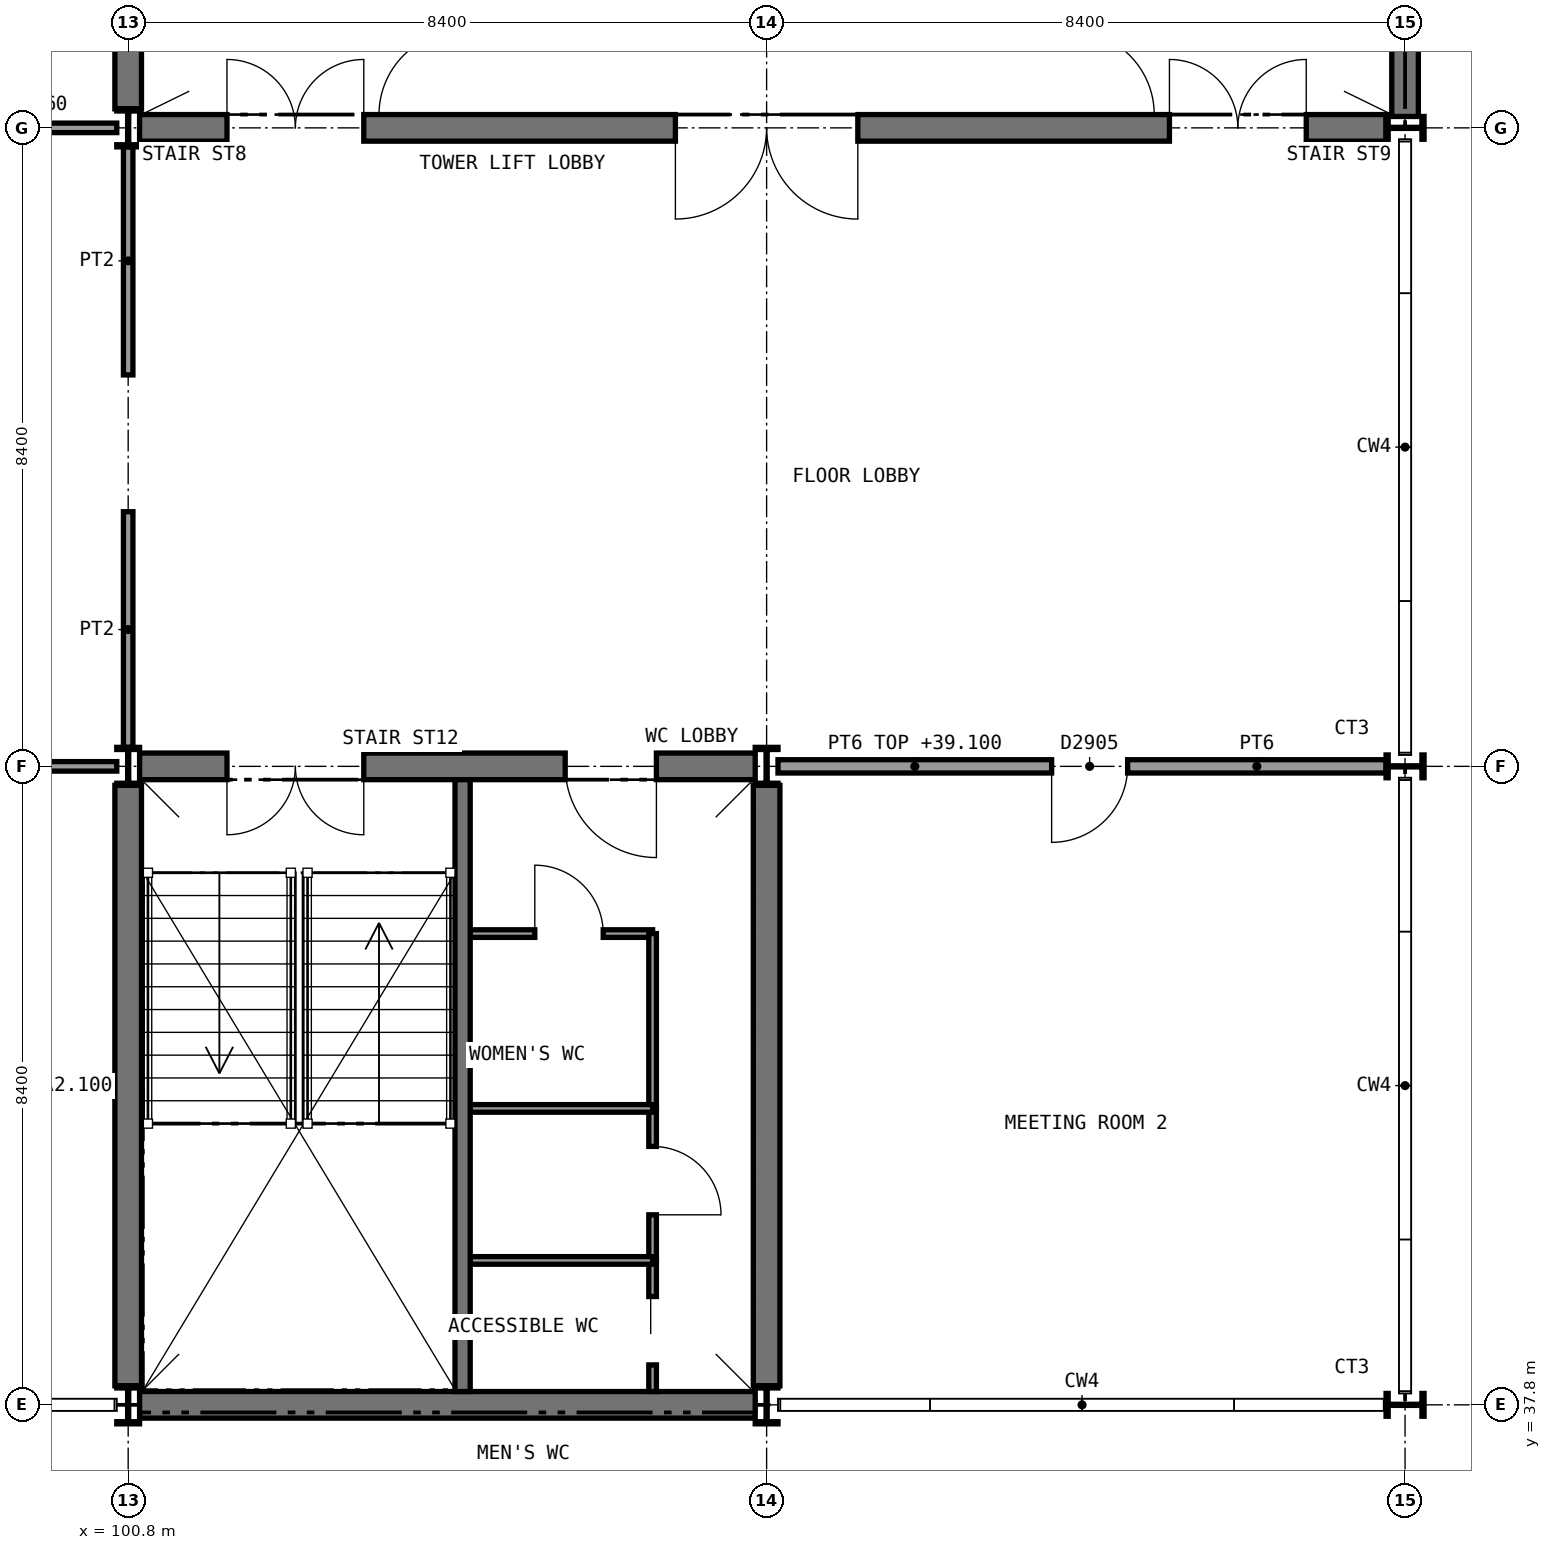
"""IFC4 building model, lengths in metres.
Left out: names, types, materials, properties, quantities, classifications, styles, units other than length and angle.
Written with IfcOpenShell. Run it as: python <this file> out.ifc"""

import sys

from ifc_helpers import new_model, si_unit, direction, frame, frame_2d, origin, origin_2d, place, context, subcontext, project, spatial, rectangle, i_section, extrude, element, fill, save


model = new_model("IFC4")
c1 = context("Model", 3, precision=1e-05, world=origin(), true_north=direction((0.0, 1.0)))
c2 = subcontext(c1, "Body", "Model", "MODEL_VIEW")
j1 = project(units=[si_unit("LENGTHUNIT", "METRE"), si_unit("PLANEANGLEUNIT", "RADIAN")], contexts=[c1])
p1 = place(None, origin())
s1 = spatial("IfcSite", under=j1, at=p1, CompositionType="ELEMENT")
p2 = place(p1, origin())
s2 = spatial("IfcBuilding", under=s1, at=p2, CompositionType="ELEMENT")
p3 = place(p2, frame((0.0, 0.0, 35.6)))
s3 = spatial("IfcBuildingStorey", under=s2, at=p3, CompositionType="ELEMENT", Elevation=35.6)
p4 = place(p3, frame((100.95, 54.6, 0.0), z_axis=(0.0, 0.0, 1.0), x_axis=(1.0, 0.0, 0.0)))
e1 = element("IfcWall", 1, at=p4, inside=s3, PredefinedType="SHEAR", context=c2, shape_type="SweptSolid", body=[
    extrude(rectangle(XDim=16.4, YDim=0.35, at=frame_2d((8.2, 0.0))), origin(), (0.0, 0.0, 1.0), 3.85),
])
p5 = place(p4, frame((1.15, 0.0, 0.0)))
e2 = element("IfcOpeningElement", 2, at=p5, cuts=e1, PredefinedType="OPENING", context=c2, shape_type="SweptSolid", body=[
    extrude(rectangle(XDim=1.8, YDim=2.1, at=frame_2d((0.9, 1.05))), frame((0.0, 0.185, 0.0), z_axis=(0.0, -1.0, 0.0), x_axis=(1.0, 0.0, 0.0)), (0.0, 0.0, 1.0), 0.37),
])
p6 = place(p4, frame((13.55, 0.0, 0.0)))
e3 = element("IfcOpeningElement", 3, at=p6, cuts=e1, PredefinedType="OPENING", context=c2, shape_type="SweptSolid", body=[
    extrude(rectangle(XDim=1.8, YDim=2.1, at=frame_2d((0.9, 1.05))), frame((0.0, 0.185, 0.0), z_axis=(0.0, -1.0, 0.0), x_axis=(1.0, 0.0, 0.0)), (0.0, 0.0, 1.0), 0.37),
])
p7 = place(p4, frame((7.05, 0.0, 0.0)))
e4 = element("IfcOpeningElement", 4, at=p7, cuts=e1, PredefinedType="OPENING", context=c2, shape_type="SweptSolid", body=[
    extrude(rectangle(XDim=2.4, YDim=2.4, at=frame_2d((1.2, 1.2))), frame((0.0, 0.185, 0.0), z_axis=(0.0, -1.0, 0.0), x_axis=(1.0, 0.0, 0.0)), (0.0, 0.0, 1.0), 0.37),
])
p8 = place(p3, frame((100.8, 54.85, 0.0), z_axis=(0.0, 0.0, 1.0), x_axis=(0.0, 1.0, 0.0)))
e5 = element("IfcWall", 5, at=p8, inside=s3, PredefinedType="SHEAR", context=c2, shape_type="SweptSolid", body=[
    extrude(rectangle(XDim=7.9, YDim=0.35, at=frame_2d((3.95, 0.0))), origin(), (0.0, 0.0, 1.0), 3.85),
])
for number, where, z_axis, x_axis in (
    (6, (117.6, 54.75, 0.0), (0.0, 0.0, 1.0), (0.0, 1.0, 0.0)),
    (7, (100.95, 37.8, 0.0), (0.0, 0.0, 1.0), (1.0, 0.0, 0.0)),
):
    element("IfcWall", number, at=place(p3, frame(where, z_axis=z_axis, x_axis=x_axis)), inside=s3, PredefinedType="SHEAR", context=c2, shape_type="SweptSolid", body=[
        extrude(rectangle(XDim=8.1, YDim=0.35, at=frame_2d((4.05, 0.0))), origin(), (0.0, 0.0, 1.0), 3.85),
    ])
p9 = place(p3, frame((100.95, 46.2, 0.0), z_axis=(0.0, 0.0, 1.0), x_axis=(1.0, 0.0, 0.0)))
e8 = element("IfcWall", 8, at=p9, inside=s3, PredefinedType="SHEAR", context=c2, shape_type="SweptSolid", body=[
    extrude(rectangle(XDim=8.1, YDim=0.35, at=frame_2d((4.05, 0.0))), origin(), (0.0, 0.0, 1.0), 3.85),
])
p10 = place(p9, frame((1.15, 0.0, 0.0)))
e9 = element("IfcOpeningElement", 9, at=p10, cuts=e8, PredefinedType="OPENING", context=c2, shape_type="SweptSolid", body=[
    extrude(rectangle(XDim=1.8, YDim=2.1, at=frame_2d((0.9, 1.05))), frame((0.0, 0.185, 0.0), z_axis=(0.0, -1.0, 0.0), x_axis=(1.0, 0.0, 0.0)), (0.0, 0.0, 1.0), 0.37),
])
p11 = place(p9, frame((5.6, 0.0, 0.0)))
e10 = element("IfcOpeningElement", 10, at=p11, cuts=e8, PredefinedType="OPENING", context=c2, shape_type="SweptSolid", body=[
    extrude(rectangle(XDim=1.2, YDim=2.1, at=frame_2d((0.6, 1.05))), frame((0.0, 0.185, 0.0), z_axis=(0.0, -1.0, 0.0), x_axis=(1.0, 0.0, 0.0)), (0.0, 0.0, 1.0), 0.37),
])
for number, where, z_axis, x_axis in (
    (11, (100.8, 38.05, 0.0), (0.0, 0.0, 1.0), (0.0, 1.0, 0.0)),
    (12, (109.2, 38.05, 0.0), (0.0, 0.0, 1.0), (0.0, 1.0, 0.0)),
):
    element("IfcWall", number, at=place(p3, frame(where, z_axis=z_axis, x_axis=x_axis)), inside=s3, PredefinedType="SHEAR", context=c2, shape_type="SweptSolid", body=[
        extrude(rectangle(XDim=7.9, YDim=0.35, at=frame_2d((3.95, 0.0))), origin(), (0.0, 0.0, 1.0), 3.85),
    ])
for number, where, z_axis, x_axis in (
    (13, (100.8, 37.8, 0.0), (0.0, 0.0, 1.0), (1.0, 0.0, 0.0)),
    (14, (100.8, 46.2, 0.0), (0.0, 0.0, 1.0), (1.0, 0.0, 0.0)),
    (15, (100.8, 54.6, 0.0), (0.0, 0.0, 1.0), (1.0, 0.0, 0.0)),
    (16, (109.2, 37.8, 0.0), (0.0, 0.0, 1.0), (1.0, 0.0, 0.0)),
    (17, (109.2, 46.2, 0.0), (0.0, 0.0, 1.0), (1.0, 0.0, 0.0)),
    (18, (117.6, 37.8, 0.0), (0.0, 0.0, 1.0), (0.0, 1.0, 0.0)),
    (19, (117.6, 46.2, 0.0), (0.0, 0.0, 1.0), (0.0, 1.0, 0.0)),
    (20, (117.6, 54.6, 0.0), (0.0, 0.0, 1.0), (0.0, 1.0, 0.0)),
):
    element("IfcColumn", number, at=place(p3, frame(where, z_axis=z_axis, x_axis=x_axis)), inside=s3, PredefinedType="COLUMN", context=c2, shape_type="SweptSolid", body=[
        extrude(i_section(OverallWidth=0.3, OverallDepth=0.5, WebThickness=0.014, FlangeThickness=0.028, FilletRadius=0.027, at=origin_2d()), origin(), (0.0, 0.0, 1.0), 4.0),
    ])
p12 = place(p3, frame((105.3, 44.0, 0.0), z_axis=(0.0, 0.0, 1.0), x_axis=(1.0, 0.0, 0.0)))
e21 = element("IfcWall", 21, at=p12, inside=s3, PredefinedType="PARTITIONING", context=c2, shape_type="SweptSolid", body=[
    extrude(rectangle(XDim=2.4, YDim=0.1, at=frame_2d((1.2, 0.0))), origin(), (0.0, 0.0, 1.0), 3.78),
])
p13 = place(p12, frame((0.85, 0.0, 0.0)))
e22 = element("IfcOpeningElement", 22, at=p13, cuts=e21, PredefinedType="OPENING", context=c2, shape_type="SweptSolid", body=[
    extrude(rectangle(XDim=0.9, YDim=2.1, at=frame_2d((0.45, 1.05))), frame((0.0, 0.06, 0.0), z_axis=(0.0, -1.0, 0.0), x_axis=(1.0, 0.0, 0.0)), (0.0, 0.0, 1.0), 0.12),
])
p14 = place(p3, frame((107.7, 41.7, 0.0), z_axis=(0.0, 0.0, 1.0), x_axis=(0.0, 1.0, 0.0)))
e23 = element("IfcWall", 23, at=p14, inside=s3, PredefinedType="PARTITIONING", context=c2, shape_type="SweptSolid", body=[
    extrude(rectangle(XDim=2.3, YDim=0.1, at=frame_2d((1.15, 0.0))), origin(), (0.0, 0.0, 1.0), 3.78),
])
p15 = place(p3, frame((107.7, 39.7, 0.0), z_axis=(0.0, 0.0, 1.0), x_axis=(0.0, 1.0, 0.0)))
e24 = element("IfcWall", 24, at=p15, inside=s3, PredefinedType="PARTITIONING", context=c2, shape_type="SweptSolid", body=[
    extrude(rectangle(XDim=2.0, YDim=0.1, at=frame_2d((1.0, 0.0))), origin(), (0.0, 0.0, 1.0), 3.78),
])
p16 = place(p15, frame((0.6, 0.0, 0.0)))
e25 = element("IfcOpeningElement", 25, at=p16, cuts=e24, PredefinedType="OPENING", context=c2, shape_type="SweptSolid", body=[
    extrude(rectangle(XDim=0.9, YDim=2.1, at=frame_2d((0.45, 1.05))), frame((0.0, 0.06, 0.0), z_axis=(0.0, -1.0, 0.0), x_axis=(1.0, 0.0, 0.0)), (0.0, 0.0, 1.0), 0.12),
])
p17 = place(p3, frame((107.7, 37.975, 0.0), z_axis=(0.0, 0.0, 1.0), x_axis=(0.0, 1.0, 0.0)))
e26 = element("IfcWall", 26, at=p17, inside=s3, PredefinedType="PARTITIONING", context=c2, shape_type="SweptSolid", body=[
    extrude(rectangle(XDim=1.725, YDim=0.1, at=frame_2d((0.862, 0.0))), origin(), (0.0, 0.0, 1.0), 3.78),
])
p18 = place(p17, frame((0.35, 0.0, 0.0)))
e27 = element("IfcOpeningElement", 27, at=p18, cuts=e26, PredefinedType="OPENING", context=c2, shape_type="SweptSolid", body=[
    extrude(rectangle(XDim=0.9, YDim=2.1, at=frame_2d((0.45, 1.05))), frame((0.0, 0.06, 0.0), z_axis=(0.0, -1.0, 0.0), x_axis=(1.0, 0.0, 0.0)), (0.0, 0.0, 1.0), 0.12),
])
for number, where, z_axis, x_axis in (
    (28, (105.3, 41.7, 0.0), (0.0, 0.0, 1.0), (1.0, 0.0, 0.0)),
    (29, (105.3, 39.7, 0.0), (0.0, 0.0, 1.0), (1.0, 0.0, 0.0)),
):
    element("IfcWall", number, at=place(p3, frame(where, z_axis=z_axis, x_axis=x_axis)), inside=s3, PredefinedType="PARTITIONING", context=c2, shape_type="SweptSolid", body=[
        extrude(rectangle(XDim=2.4, YDim=0.1, at=frame_2d((1.2, 0.0))), origin(), (0.0, 0.0, 1.0), 3.78),
    ])
p19 = place(p3, frame((92.55, 46.2, 0.0), z_axis=(0.0, 0.0, 1.0), x_axis=(1.0, 0.0, 0.0)))
e30 = element("IfcWall", 30, at=p19, inside=s3, PredefinedType="PARTITIONING", context=c2, shape_type="SweptSolid", body=[
    extrude(rectangle(XDim=8.1, YDim=0.125, at=frame_2d((4.05, 0.0))), origin(), (0.0, 0.0, 1.0), 3.5),
])
p20 = place(p19, frame((3.1, 0.0, 0.0)))
e31 = element("IfcOpeningElement", 31, at=p20, cuts=e30, PredefinedType="OPENING", context=c2, shape_type="SweptSolid", body=[
    extrude(rectangle(XDim=1.8, YDim=2.1, at=frame_2d((0.9, 1.05))), frame((0.0, 0.073, 0.0), z_axis=(0.0, -1.0, 0.0), x_axis=(1.0, 0.0, 0.0)), (0.0, 0.0, 1.0), 0.145),
])
p21 = place(p3, frame((109.35, 46.2, 0.0), z_axis=(0.0, 0.0, 1.0), x_axis=(1.0, 0.0, 0.0)))
e32 = element("IfcWall", 32, at=p21, inside=s3, PredefinedType="PARTITIONING", context=c2, shape_type="SweptSolid", body=[
    extrude(rectangle(XDim=8.0, YDim=0.175, at=frame_2d((4.0, 0.0))), origin(), (0.0, 0.0, 1.0), 3.5),
])
p22 = place(p21, frame((3.6, 0.0, 0.0)))
e33 = element("IfcOpeningElement", 33, at=p22, cuts=e32, PredefinedType="OPENING", context=c2, shape_type="SweptSolid", body=[
    extrude(rectangle(XDim=1.0, YDim=2.1, at=frame_2d((0.5, 1.05))), frame((0.0, 0.098, 0.0), z_axis=(0.0, -1.0, 0.0), x_axis=(1.0, 0.0, 0.0)), (0.0, 0.0, 1.0), 0.195),
])
p23 = place(p3, frame((100.8, 46.45, 0.0), z_axis=(0.0, 0.0, 1.0), x_axis=(0.0, 1.0, 0.0)))
e34 = element("IfcWall", 34, at=p23, inside=s3, PredefinedType="PARTITIONING", context=c2, shape_type="SweptSolid", body=[
    extrude(rectangle(XDim=3.1, YDim=0.125, at=frame_2d((1.55, 0.0))), origin(), (0.0, 0.0, 1.0), 3.5),
])
p24 = place(p3, frame((100.8, 51.35, 0.0), z_axis=(0.0, 0.0, 1.0), x_axis=(0.0, 1.0, 0.0)))
e35 = element("IfcWall", 35, at=p24, inside=s3, PredefinedType="PARTITIONING", context=c2, shape_type="SweptSolid", body=[
    extrude(rectangle(XDim=3.0, YDim=0.125, at=frame_2d((1.5, 0.0))), origin(), (0.0, 0.0, 1.0), 3.5),
])
p25 = place(p3, frame((92.55, 54.6, 0.0), z_axis=(0.0, 0.0, 1.0), x_axis=(1.0, 0.0, 0.0)))
e36 = element("IfcWall", 36, at=p25, inside=s3, PredefinedType="PARTITIONING", context=c2, shape_type="SweptSolid", body=[
    extrude(rectangle(XDim=8.1, YDim=0.125, at=frame_2d((4.05, 0.0))), origin(), (0.0, 0.0, 1.0), 3.56),
])
p26 = place(p25, frame((3.6, 0.0, 0.0)))
e37 = element("IfcOpeningElement", 37, at=p26, cuts=e36, PredefinedType="OPENING", context=c2, shape_type="SweptSolid", body=[
    extrude(rectangle(XDim=0.9, YDim=2.1, at=frame_2d((0.45, 1.05))), frame((0.0, 0.073, 0.0), z_axis=(0.0, -1.0, 0.0), x_axis=(1.0, 0.0, 0.0)), (0.0, 0.0, 1.0), 0.145),
])
p27 = place(p3, frame((105.2, 62.825, 0.0), z_axis=(0.0, 0.0, 1.0), x_axis=(0.0, -1.0, 0.0)))
e38 = element("IfcWall", 38, at=p27, inside=s3, PredefinedType="SHEAR", context=c2, shape_type="SweptSolid", body=[
    extrude(rectangle(XDim=8.05, YDim=0.2, at=frame_2d((4.025, 0.0))), origin(), (0.0, 0.0, 1.0), 3.85),
])
p28 = place(p27, frame((6.95, 0.0, 0.0)))
e39 = element("IfcOpeningElement", 39, at=p28, cuts=e38, PredefinedType="OPENING", context=c2, shape_type="SweptSolid", body=[
    extrude(rectangle(XDim=1.11, YDim=2.1, at=frame_2d((0.555, 1.05))), frame((0.0, 0.11, 0.0), z_axis=(0.0, -1.0, 0.0), x_axis=(1.0, 0.0, 0.0)), (0.0, 0.0, 1.0), 0.22),
])
p29 = place(p3, frame((113.2, 62.825, 0.0), z_axis=(0.0, 0.0, 1.0), x_axis=(0.0, -1.0, 0.0)))
e40 = element("IfcWall", 40, at=p29, inside=s3, PredefinedType="SHEAR", context=c2, shape_type="SweptSolid", body=[
    extrude(rectangle(XDim=8.05, YDim=0.2, at=frame_2d((4.025, 0.0))), origin(), (0.0, 0.0, 1.0), 3.85),
])
p30 = place(p29, frame((6.95, 0.0, 0.0)))
e41 = element("IfcOpeningElement", 41, at=p30, cuts=e40, PredefinedType="OPENING", context=c2, shape_type="SweptSolid", body=[
    extrude(rectangle(XDim=1.11, YDim=2.1, at=frame_2d((0.555, 1.05))), frame((0.0, 0.11, 0.0), z_axis=(0.0, -1.0, 0.0), x_axis=(1.0, 0.0, 0.0)), (0.0, 0.0, 1.0), 0.22),
])
p31 = place(p3, frame((105.2, 37.975, 0.0), z_axis=(0.0, 0.0, 1.0), x_axis=(0.0, 1.0, 0.0)))
e42 = element("IfcWall", 42, at=p31, inside=s3, PredefinedType="SHEAR", context=c2, shape_type="SweptSolid", body=[
    extrude(rectangle(XDim=8.05, YDim=0.2, at=frame_2d((4.025, 0.0))), origin(), (0.0, 0.0, 1.0), 3.85),
])
p32 = place(p13, origin())
e43 = element("IfcDoor", 43, at=p32, inside=s3, OperationType="SINGLE_SWING_LEFT", PredefinedType="DOOR", context=c2, shape_type="SweptSolid", body=[
    extrude(rectangle(XDim=0.9, YDim=2.1, at=frame_2d((0.45, 1.05))), frame((0.0, 0.025, 0.0), z_axis=(0.0, -1.0, 0.0), x_axis=(1.0, 0.0, 0.0)), (0.0, 0.0, 1.0), 0.05),
])
fill(e22, e43)
p33 = place(p16, frame((0.9, 0.0, 0.0), z_axis=(0.0, 0.0, 1.0), x_axis=(-1.0, 0.0, 0.0)))
e44 = element("IfcDoor", 44, at=p33, inside=s3, OperationType="SINGLE_SWING_RIGHT", PredefinedType="DOOR", context=c2, shape_type="SweptSolid", body=[
    extrude(rectangle(XDim=0.9, YDim=2.1, at=frame_2d((0.45, 1.05))), frame((0.0, 0.025, 0.0), z_axis=(0.0, -1.0, 0.0), x_axis=(1.0, 0.0, 0.0)), (0.0, 0.0, 1.0), 0.05),
])
fill(e25, e44)
p34 = place(p18, origin())
e45 = element("IfcDoor", 45, at=p34, inside=s3, OperationType="SLIDING_TO_RIGHT", PredefinedType="DOOR", context=c2, shape_type="SweptSolid", body=[
    extrude(rectangle(XDim=0.9, YDim=2.1, at=frame_2d((0.45, 1.05))), frame((0.0, 0.025, 0.0), z_axis=(0.0, -1.0, 0.0), x_axis=(1.0, 0.0, 0.0)), (0.0, 0.0, 1.0), 0.05),
])
fill(e27, e45)
p35 = place(p22, frame((1.0, 0.0, 0.0), z_axis=(0.0, 0.0, 1.0), x_axis=(-1.0, 0.0, 0.0)))
e46 = element("IfcDoor", 46, at=p35, inside=s3, OperationType="SINGLE_SWING_RIGHT", PredefinedType="DOOR", context=c2, shape_type="SweptSolid", body=[
    extrude(rectangle(XDim=1.0, YDim=2.1, at=frame_2d((0.5, 1.05))), frame((0.0, 0.025, 0.0), z_axis=(0.0, -1.0, 0.0), x_axis=(1.0, 0.0, 0.0)), (0.0, 0.0, 1.0), 0.05),
])
fill(e33, e46)
p36 = place(p28, frame((1.1, 0.0, 0.0), z_axis=(0.0, 0.0, 1.0), x_axis=(-1.0, 0.0, 0.0)))
e47 = element("IfcDoor", 47, at=p36, inside=s3, OperationType="SINGLE_SWING_LEFT", PredefinedType="DOOR", context=c2, shape_type="SweptSolid", body=[
    extrude(rectangle(XDim=1.1, YDim=2.1, at=frame_2d((0.55, 1.05))), frame((0.0, 0.025, 0.0), z_axis=(0.0, -1.0, 0.0), x_axis=(1.0, 0.0, 0.0)), (0.0, 0.0, 1.0), 0.05),
])
fill(e39, e47)
p37 = place(p30, origin())
e48 = element("IfcDoor", 48, at=p37, inside=s3, OperationType="SINGLE_SWING_RIGHT", PredefinedType="DOOR", context=c2, shape_type="SweptSolid", body=[
    extrude(rectangle(XDim=1.1, YDim=2.1, at=frame_2d((0.55, 1.05))), frame((0.0, 0.025, 0.0), z_axis=(0.0, -1.0, 0.0), x_axis=(1.0, 0.0, 0.0)), (0.0, 0.0, 1.0), 0.05),
])
fill(e41, e48)
p38 = place(p5, origin())
e49 = element("IfcDoor", 49, at=p38, inside=s3, OperationType="DOUBLE_DOOR_SINGLE_SWING", PredefinedType="DOOR", context=c2, shape_type="SweptSolid", body=[
    extrude(rectangle(XDim=1.8, YDim=2.1, at=frame_2d((0.9, 1.05))), frame((0.0, 0.025, 0.0), z_axis=(0.0, -1.0, 0.0), x_axis=(1.0, 0.0, 0.0)), (0.0, 0.0, 1.0), 0.05),
])
fill(e2, e49)
p39 = place(p6, origin())
e50 = element("IfcDoor", 50, at=p39, inside=s3, OperationType="DOUBLE_DOOR_SINGLE_SWING", PredefinedType="DOOR", context=c2, shape_type="SweptSolid", body=[
    extrude(rectangle(XDim=1.8, YDim=2.1, at=frame_2d((0.9, 1.05))), frame((0.0, 0.025, 0.0), z_axis=(0.0, -1.0, 0.0), x_axis=(1.0, 0.0, 0.0)), (0.0, 0.0, 1.0), 0.05),
])
fill(e3, e50)
p40 = place(p7, frame((2.4, 0.0, 0.0), z_axis=(0.0, 0.0, 1.0), x_axis=(-1.0, 0.0, 0.0)))
e51 = element("IfcDoor", 51, at=p40, inside=s3, OperationType="DOUBLE_DOOR_SINGLE_SWING", PredefinedType="DOOR", context=c2, shape_type="SweptSolid", body=[
    extrude(rectangle(XDim=2.4, YDim=2.4, at=frame_2d((1.2, 1.2))), frame((0.0, 0.025, 0.0), z_axis=(0.0, -1.0, 0.0), x_axis=(1.0, 0.0, 0.0)), (0.0, 0.0, 1.0), 0.05),
])
fill(e4, e51)
p41 = place(p10, frame((1.8, 0.0, 0.0), z_axis=(0.0, 0.0, 1.0), x_axis=(-1.0, 0.0, 0.0)))
e52 = element("IfcDoor", 52, at=p41, inside=s3, OperationType="DOUBLE_DOOR_SINGLE_SWING", PredefinedType="DOOR", context=c2, shape_type="SweptSolid", body=[
    extrude(rectangle(XDim=1.8, YDim=2.1, at=frame_2d((0.9, 1.05))), frame((0.0, 0.025, 0.0), z_axis=(0.0, -1.0, 0.0), x_axis=(1.0, 0.0, 0.0)), (0.0, 0.0, 1.0), 0.05),
])
fill(e9, e52)
p42 = place(p11, frame((1.2, 0.0, 0.0), z_axis=(0.0, 0.0, 1.0), x_axis=(-1.0, 0.0, 0.0)))
e53 = element("IfcDoor", 53, at=p42, inside=s3, OperationType="SINGLE_SWING_LEFT", PredefinedType="DOOR", context=c2, shape_type="SweptSolid", body=[
    extrude(rectangle(XDim=1.2, YDim=2.1, at=frame_2d((0.6, 1.05))), frame((0.0, 0.025, 0.0), z_axis=(0.0, -1.0, 0.0), x_axis=(1.0, 0.0, 0.0)), (0.0, 0.0, 1.0), 0.05),
])
fill(e10, e53)
save(model, sys.argv[1])
